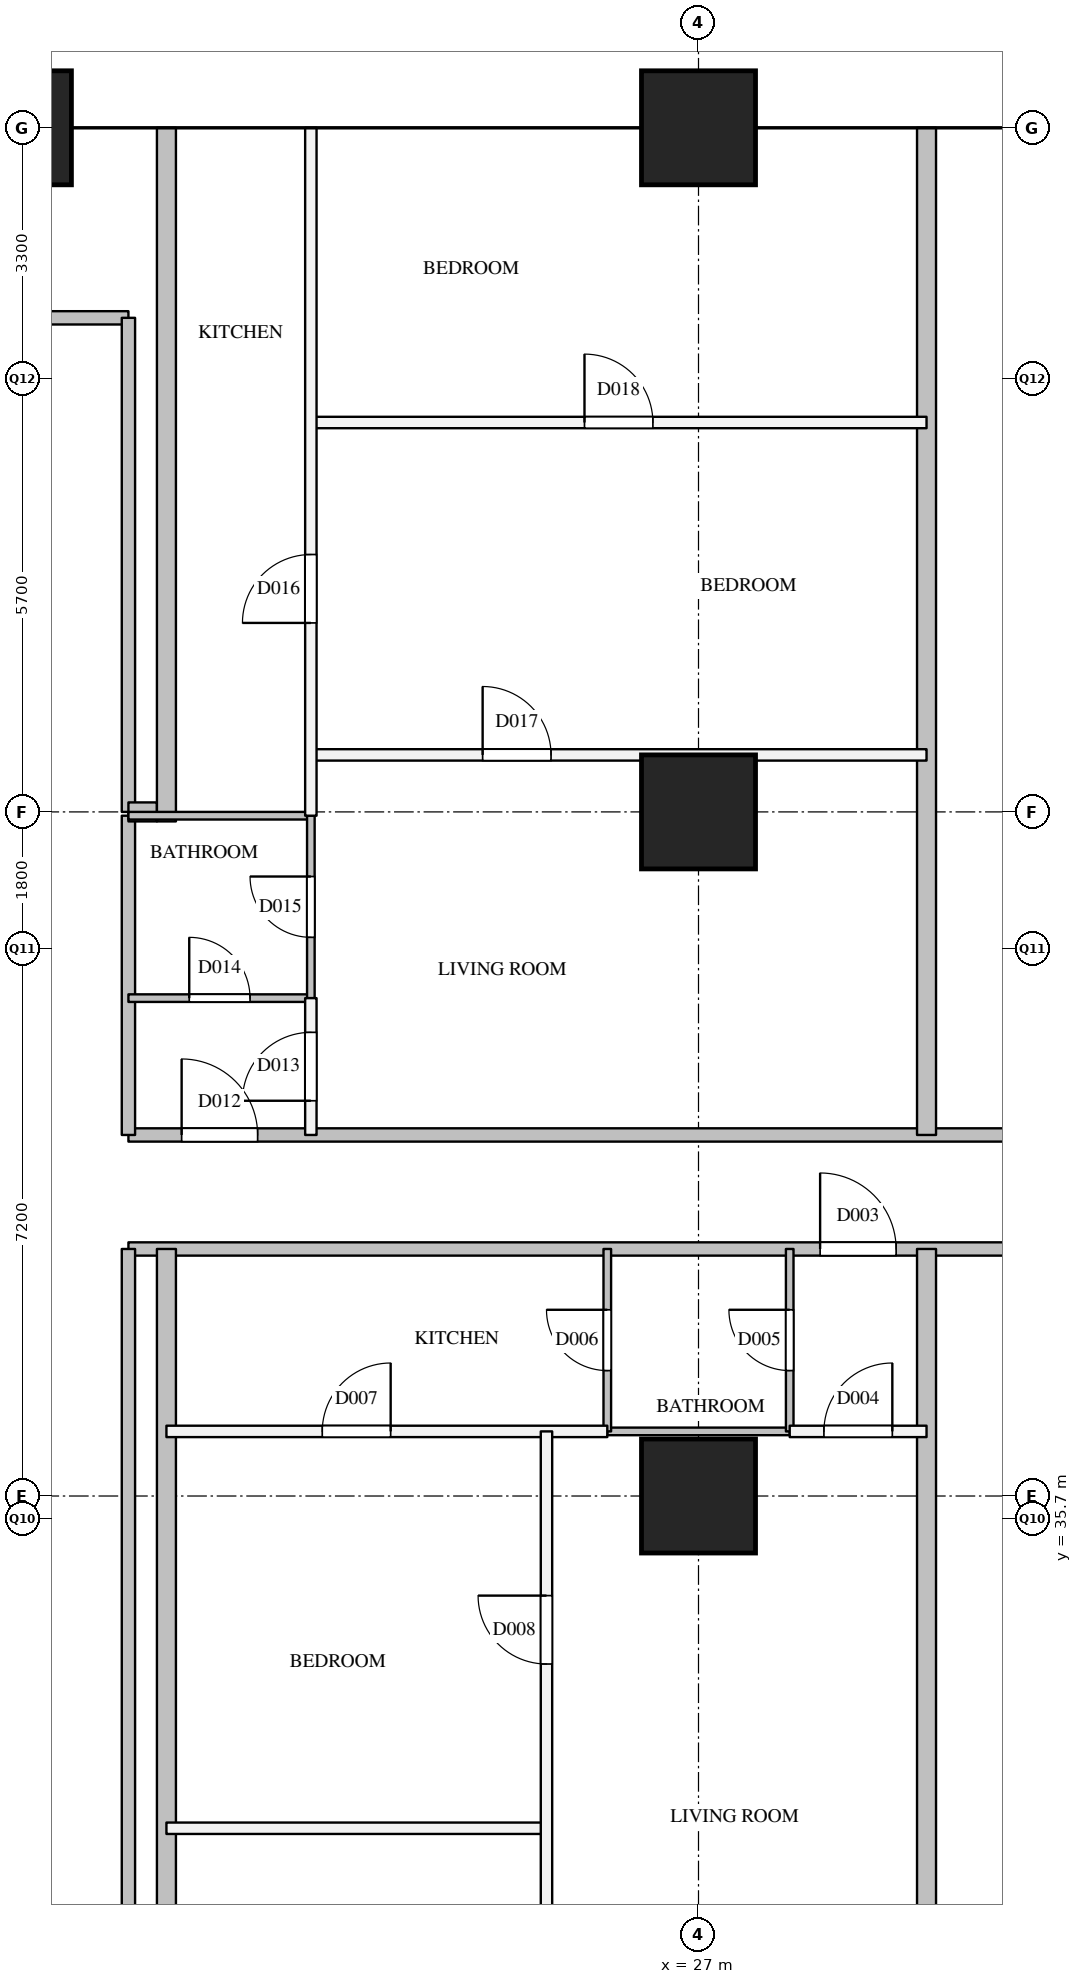
"""IFC4 building model, lengths in metres.
Left out: names, types, materials, properties, quantities, classifications, styles, units other than length and angle.
Written with IfcOpenShell. Run it as: python <this file> out.ifc"""

import sys

from ifc_helpers import new_model, si_unit, direction, frame, frame_2d, origin, origin_2d, place, context, subcontext, project, spatial, rectangle, extrude, element, fill, save


model = new_model("IFC4")
c1 = context("Model", 3, precision=1e-05, world=origin(), true_north=direction((0.0, 1.0)))
c2 = subcontext(c1, "Body", "Model", "MODEL_VIEW")
j1 = project(units=[si_unit("LENGTHUNIT", "METRE"), si_unit("PLANEANGLEUNIT", "RADIAN")], contexts=[c1])
p1 = place(None, origin())
s1 = spatial("IfcSite", under=j1, at=p1, CompositionType="ELEMENT")
p2 = place(p1, origin())
s2 = spatial("IfcBuilding", under=s1, at=p2, CompositionType="ELEMENT")
p3 = place(p2, frame((0.0, 0.0, 134.9)))
s3 = spatial("IfcBuildingStorey", under=s2, at=p3, CompositionType="ELEMENT", Elevation=134.9)
for number, where, z_axis, x_axis in (
    (1, (18.0, 54.0, 0.0), (0.0, 0.0, 1.0), (1.0, 0.0, 0.0)),
    (2, (27.0, 36.0, 0.0), (0.0, 0.0, 1.0), (1.0, 0.0, 0.0)),
    (3, (27.0, 45.0, 0.0), (0.0, 0.0, 1.0), (1.0, 0.0, 0.0)),
    (4, (27.0, 54.0, 0.0), (0.0, 0.0, 1.0), (1.0, 0.0, 0.0)),
):
    element("IfcColumn", number, at=place(p3, frame(where, z_axis=z_axis, x_axis=x_axis)), inside=s3, PredefinedType="COLUMN", context=c2, shape_type="SweptSolid", body=[
        extrude(rectangle(XDim=1.5, YDim=1.5, at=origin_2d()), origin(), (0.0, 0.0, 1.0), 3.9),
    ])
p4 = place(p3, frame((19.5, 39.25, 0.0), z_axis=(0.0, 0.0, 1.0), x_axis=(1.0, 0.0, 0.0)))
e5 = element("IfcWall", 5, at=p4, inside=s3, PredefinedType="PARTITIONING", context=c2, shape_type="SweptSolid", body=[
    extrude(rectangle(XDim=15.0, YDim=0.175, at=frame_2d((7.5, 0.0))), origin(), (0.0, 0.0, 1.0), 2.6),
])
p5 = place(p4, frame((9.1, 0.0, 0.0)))
e6 = element("IfcOpeningElement", 6, at=p5, cuts=e5, PredefinedType="OPENING", context=c2, shape_type="SweptSolid", body=[
    extrude(rectangle(XDim=1.0, YDim=2.1, at=frame_2d((0.5, 1.05))), frame((0.0, 0.097, 0.0), z_axis=(0.0, -1.0, 0.0), x_axis=(1.0, 0.0, 0.0)), (0.0, 0.0, 1.0), 0.195),
])
p6 = place(p3, frame((19.5, 40.75, 0.0), z_axis=(0.0, 0.0, 1.0), x_axis=(1.0, 0.0, 0.0)))
e7 = element("IfcWall", 7, at=p6, inside=s3, PredefinedType="PARTITIONING", context=c2, shape_type="SweptSolid", body=[
    extrude(rectangle(XDim=15.0, YDim=0.175, at=frame_2d((7.5, 0.0))), origin(), (0.0, 0.0, 1.0), 2.6),
])
p7 = place(p6, frame((0.7, 0.0, 0.0)))
e8 = element("IfcOpeningElement", 8, at=p7, cuts=e7, PredefinedType="OPENING", context=c2, shape_type="SweptSolid", body=[
    extrude(rectangle(XDim=1.0, YDim=2.1, at=frame_2d((0.5, 1.05))), frame((0.0, 0.097, 0.0), z_axis=(0.0, -1.0, 0.0), x_axis=(1.0, 0.0, 0.0)), (0.0, 0.0, 1.0), 0.195),
])
p8 = place(p3, frame((4.1, 51.5, 0.0), z_axis=(0.0, 0.0, 1.0), x_axis=(1.0, 0.0, 0.0)))
e9 = element("IfcWall", 9, at=p8, inside=s3, PredefinedType="PARTITIONING", context=c2, shape_type="SweptSolid", body=[
    extrude(rectangle(XDim=15.4, YDim=0.175, at=frame_2d((7.7, 0.0))), origin(), (0.0, 0.0, 1.0), 3.6),
])
p9 = place(p8, frame((9.284, 0.0, 0.0)))
e10 = element("IfcOpeningElement", 10, at=p9, cuts=e9, PredefinedType="OPENING", context=c2, shape_type="SweptSolid", body=[
    extrude(rectangle(XDim=0.9, YDim=2.1, at=frame_2d((0.45, 1.05))), frame((0.0, 0.097, 0.0), z_axis=(0.0, -1.0, 0.0), x_axis=(1.0, 0.0, 0.0)), (0.0, 0.0, 1.0), 0.195),
])
p10 = place(p3, frame((19.5, 28.5, 0.0), z_axis=(0.0, 0.0, 1.0), x_axis=(0.0, 1.0, 0.0)))
e11 = element("IfcWall", 11, at=p10, inside=s3, PredefinedType="PARTITIONING", context=c2, shape_type="SweptSolid", body=[
    extrude(rectangle(XDim=10.75, YDim=0.175, at=frame_2d((5.375, 0.0))), origin(), (0.0, 0.0, 1.0), 3.6),
])
p11 = place(p3, frame((19.5, 40.75, 0.0), z_axis=(0.0, 0.0, 1.0), x_axis=(0.0, 1.0, 0.0)))
e12 = element("IfcWall", 12, at=p11, inside=s3, PredefinedType="PARTITIONING", context=c2, shape_type="SweptSolid", body=[
    extrude(rectangle(XDim=4.2, YDim=0.175, at=frame_2d((2.1, 0.0))), origin(), (0.0, 0.0, 1.0), 3.6),
])
p12 = place(p3, frame((19.5, 45.0, 0.0), z_axis=(0.0, 0.0, 1.0), x_axis=(0.0, 1.0, 0.0)))
e13 = element("IfcWall", 13, at=p12, inside=s3, PredefinedType="PARTITIONING", context=c2, shape_type="SweptSolid", body=[
    extrude(rectangle(XDim=6.5, YDim=0.175, at=frame_2d((3.25, 0.0))), origin(), (0.0, 0.0, 1.0), 3.6),
])
p13 = place(p3, frame((20.0, 31.629, 0.0), z_axis=(0.0, 0.0, 1.0), x_axis=(1.0, 0.0, 0.0)))
e14 = element("IfcWall", 14, at=p13, inside=s3, PredefinedType="PARTITIONING", context=c2, shape_type="SweptSolid", body=[
    extrude(rectangle(XDim=5.0, YDim=0.15, at=frame_2d((2.5, 0.0))), origin(), (0.0, 0.0, 1.0), 3.6),
])
p14 = place(p3, frame((20.0, 36.85, 0.0), z_axis=(0.0, 0.0, 1.0), x_axis=(1.0, 0.0, 0.0)))
e15 = element("IfcWall", 15, at=p14, inside=s3, PredefinedType="PARTITIONING", context=c2, shape_type="SweptSolid", body=[
    extrude(rectangle(XDim=5.8, YDim=0.15, at=frame_2d((2.9, 0.0))), origin(), (0.0, 0.0, 1.0), 3.6),
])
p15 = place(p14, frame((2.05, 0.0, 0.0)))
e16 = element("IfcOpeningElement", 16, at=p15, cuts=e15, PredefinedType="OPENING", context=c2, shape_type="SweptSolid", body=[
    extrude(rectangle(XDim=0.9, YDim=2.1, at=frame_2d((0.45, 1.05))), frame((0.0, 0.085, 0.0), z_axis=(0.0, -1.0, 0.0), x_axis=(1.0, 0.0, 0.0)), (0.0, 0.0, 1.0), 0.17),
])
p16 = place(p3, frame((28.2, 36.85, 0.0), z_axis=(0.0, 0.0, 1.0), x_axis=(1.0, 0.0, 0.0)))
e17 = element("IfcWall", 17, at=p16, inside=s3, PredefinedType="PARTITIONING", context=c2, shape_type="SweptSolid", body=[
    extrude(rectangle(XDim=1.8, YDim=0.15, at=frame_2d((0.9, 0.0))), origin(), (0.0, 0.0, 1.0), 3.6),
])
p17 = place(p16, frame((0.45, 0.0, 0.0)))
e18 = element("IfcOpeningElement", 18, at=p17, cuts=e17, PredefinedType="OPENING", context=c2, shape_type="SweptSolid", body=[
    extrude(rectangle(XDim=0.9, YDim=2.1, at=frame_2d((0.45, 1.05))), frame((0.0, 0.085, 0.0), z_axis=(0.0, -1.0, 0.0), x_axis=(1.0, 0.0, 0.0)), (0.0, 0.0, 1.0), 0.17),
])
p18 = place(p3, frame((21.9, 45.75, 0.0), z_axis=(0.0, 0.0, 1.0), x_axis=(1.0, 0.0, 0.0)))
e19 = element("IfcWall", 19, at=p18, inside=s3, PredefinedType="PARTITIONING", context=c2, shape_type="SweptSolid", body=[
    extrude(rectangle(XDim=8.1, YDim=0.15, at=frame_2d((4.05, 0.0))), origin(), (0.0, 0.0, 1.0), 2.6),
])
p19 = place(p18, frame((2.26, 0.0, 0.0)))
e20 = element("IfcOpeningElement", 20, at=p19, cuts=e19, PredefinedType="OPENING", context=c2, shape_type="SweptSolid", body=[
    extrude(rectangle(XDim=0.9, YDim=2.1, at=frame_2d((0.45, 1.05))), frame((0.0, 0.085, 0.0), z_axis=(0.0, -1.0, 0.0), x_axis=(1.0, 0.0, 0.0)), (0.0, 0.0, 1.0), 0.17),
])
p20 = place(p3, frame((21.9, 50.123, 0.0), z_axis=(0.0, 0.0, 1.0), x_axis=(1.0, 0.0, 0.0)))
e21 = element("IfcWall", 21, at=p20, inside=s3, PredefinedType="PARTITIONING", context=c2, shape_type="SweptSolid", body=[
    extrude(rectangle(XDim=8.1, YDim=0.15, at=frame_2d((4.05, 0.0))), origin(), (0.0, 0.0, 1.0), 2.6),
])
p21 = place(p20, frame((3.6, 0.0, 0.0)))
e22 = element("IfcOpeningElement", 22, at=p21, cuts=e21, PredefinedType="OPENING", context=c2, shape_type="SweptSolid", body=[
    extrude(rectangle(XDim=0.9, YDim=2.1, at=frame_2d((0.45, 1.05))), frame((0.0, 0.085, 0.0), z_axis=(0.0, -1.0, 0.0), x_axis=(1.0, 0.0, 0.0)), (0.0, 0.0, 1.0), 0.17),
])
p22 = place(p3, frame((21.9, 40.75, 0.0), z_axis=(0.0, 0.0, 1.0), x_axis=(0.0, 1.0, 0.0)))
e23 = element("IfcWall", 23, at=p22, inside=s3, PredefinedType="PARTITIONING", context=c2, shape_type="SweptSolid", body=[
    extrude(rectangle(XDim=1.8, YDim=0.15, at=frame_2d((0.9, 0.0))), origin(), (0.0, 0.0, 1.0), 3.6),
])
p23 = place(p22, frame((0.45, 0.0, 0.0)))
e24 = element("IfcOpeningElement", 24, at=p23, cuts=e23, PredefinedType="OPENING", context=c2, shape_type="SweptSolid", body=[
    extrude(rectangle(XDim=0.9, YDim=2.1, at=frame_2d((0.45, 1.05))), frame((0.0, 0.085, 0.0), z_axis=(0.0, -1.0, 0.0), x_axis=(1.0, 0.0, 0.0)), (0.0, 0.0, 1.0), 0.17),
])
p24 = place(p3, frame((21.9, 44.95, 0.0), z_axis=(0.0, 0.0, 1.0), x_axis=(0.0, 1.0, 0.0)))
e25 = element("IfcWall", 25, at=p24, inside=s3, PredefinedType="PARTITIONING", context=c2, shape_type="SweptSolid", body=[
    extrude(rectangle(XDim=9.05, YDim=0.15, at=frame_2d((4.525, 0.0))), origin(), (0.0, 0.0, 1.0), 2.6),
])
p25 = place(p24, frame((2.536, 0.0, 0.0)))
e26 = element("IfcOpeningElement", 26, at=p25, cuts=e25, PredefinedType="OPENING", context=c2, shape_type="SweptSolid", body=[
    extrude(rectangle(XDim=0.9, YDim=2.1, at=frame_2d((0.45, 1.05))), frame((0.0, 0.085, 0.0), z_axis=(0.0, -1.0, 0.0), x_axis=(1.0, 0.0, 0.0)), (0.0, 0.0, 1.0), 0.17),
])
p26 = place(p3, frame((25.0, 27.0, 0.0), z_axis=(0.0, 0.0, 1.0), x_axis=(0.0, 1.0, 0.0)))
e27 = element("IfcWall", 27, at=p26, inside=s3, PredefinedType="PARTITIONING", context=c2, shape_type="SweptSolid", body=[
    extrude(rectangle(XDim=9.85, YDim=0.15, at=frame_2d((4.925, 0.0))), origin(), (0.0, 0.0, 1.0), 2.6),
])
p27 = place(p26, frame((6.79, 0.0, 0.0)))
e28 = element("IfcOpeningElement", 28, at=p27, cuts=e27, PredefinedType="OPENING", context=c2, shape_type="SweptSolid", body=[
    extrude(rectangle(XDim=0.9, YDim=2.1, at=frame_2d((0.45, 1.05))), frame((0.0, 0.085, 0.0), z_axis=(0.0, -1.0, 0.0), x_axis=(1.0, 0.0, 0.0)), (0.0, 0.0, 1.0), 0.17),
])
p28 = place(p26, frame((1.865, 0.0, 0.0)))
e29 = element("IfcOpeningElement", 29, at=p28, cuts=e27, PredefinedType="OPENING", context=c2, shape_type="SweptSolid", body=[
    extrude(rectangle(XDim=0.9, YDim=2.1, at=frame_2d((0.45, 1.05))), frame((0.0, 0.085, 0.0), z_axis=(0.0, -1.0, 0.0), x_axis=(1.0, 0.0, 0.0)), (0.0, 0.0, 1.0), 0.17),
])
p29 = place(p3, frame((19.5, 45.0, 0.0), z_axis=(0.0, 0.0, 1.0), x_axis=(1.0, 0.0, 0.0)))
e30 = element("IfcWall", 30, at=p29, inside=s3, PredefinedType="PARTITIONING", context=c2, shape_type="SweptSolid", body=[
    extrude(rectangle(XDim=0.375, YDim=0.25, at=frame_2d((0.188, 0.0))), origin(), (0.0, 0.0, 1.0), 3.6),
])
p30 = place(p3, frame((20.0, 27.0, 0.0), z_axis=(0.0, 0.0, 1.0), x_axis=(0.0, 1.0, 0.0)))
e31 = element("IfcWall", 31, at=p30, inside=s3, PredefinedType="PARTITIONING", context=c2, shape_type="SweptSolid", body=[
    extrude(rectangle(XDim=12.25, YDim=0.25, at=frame_2d((6.125, 0.0))), origin(), (0.0, 0.0, 1.0), 2.6),
])
p31 = place(p3, frame((20.0, 44.875, 0.0), z_axis=(0.0, 0.0, 1.0), x_axis=(0.0, 1.0, 0.0)))
e32 = element("IfcWall", 32, at=p31, inside=s3, PredefinedType="PARTITIONING", context=c2, shape_type="SweptSolid", body=[
    extrude(rectangle(XDim=9.125, YDim=0.25, at=frame_2d((4.562, 0.0))), origin(), (0.0, 0.0, 1.0), 2.6),
])
p32 = place(p3, frame((30.0, 27.0, 0.0), z_axis=(0.0, 0.0, 1.0), x_axis=(0.0, 1.0, 0.0)))
e33 = element("IfcWall", 33, at=p32, inside=s3, PredefinedType="PARTITIONING", context=c2, shape_type="SweptSolid", body=[
    extrude(rectangle(XDim=12.25, YDim=0.25, at=frame_2d((6.125, 0.0))), origin(), (0.0, 0.0, 1.0), 2.6),
])
p33 = place(p3, frame((30.0, 40.75, 0.0), z_axis=(0.0, 0.0, 1.0), x_axis=(0.0, 1.0, 0.0)))
e34 = element("IfcWall", 34, at=p33, inside=s3, PredefinedType="PARTITIONING", context=c2, shape_type="SweptSolid", body=[
    extrude(rectangle(XDim=13.25, YDim=0.25, at=frame_2d((6.625, 0.0))), origin(), (0.0, 0.0, 1.0), 2.6),
])
p34 = place(p3, frame((25.8, 36.85, 0.0), z_axis=(0.0, 0.0, 1.0), x_axis=(1.0, 0.0, 0.0)))
e35 = element("IfcWall", 35, at=p34, inside=s3, PredefinedType="PARTITIONING", context=c2, shape_type="SweptSolid", body=[
    extrude(rectangle(XDim=2.4, YDim=0.1, at=frame_2d((1.2, 0.0))), origin(), (0.0, 0.0, 1.0), 2.6),
])
p35 = place(p3, frame((19.5, 42.55, 0.0), z_axis=(0.0, 0.0, 1.0), x_axis=(1.0, 0.0, 0.0)))
e36 = element("IfcWall", 36, at=p35, inside=s3, PredefinedType="PARTITIONING", context=c2, shape_type="SweptSolid", body=[
    extrude(rectangle(XDim=2.4, YDim=0.1, at=frame_2d((1.2, 0.0))), origin(), (0.0, 0.0, 1.0), 3.6),
])
p36 = place(p35, frame((0.8, 0.0, 0.0)))
e37 = element("IfcOpeningElement", 37, at=p36, cuts=e36, PredefinedType="OPENING", context=c2, shape_type="SweptSolid", body=[
    extrude(rectangle(XDim=0.8, YDim=2.1, at=frame_2d((0.4, 1.05))), frame((0.0, 0.06, 0.0), z_axis=(0.0, -1.0, 0.0), x_axis=(1.0, 0.0, 0.0)), (0.0, 0.0, 1.0), 0.12),
])
p37 = place(p3, frame((19.5, 44.95, 0.0), z_axis=(0.0, 0.0, 1.0), x_axis=(1.0, 0.0, 0.0)))
e38 = element("IfcWall", 38, at=p37, inside=s3, PredefinedType="PARTITIONING", context=c2, shape_type="SweptSolid", body=[
    extrude(rectangle(XDim=2.4, YDim=0.1, at=frame_2d((1.2, 0.0))), origin(), (0.0, 0.0, 1.0), 3.6),
])
p38 = place(p3, frame((21.9, 42.55, 0.0), z_axis=(0.0, 0.0, 1.0), x_axis=(0.0, 1.0, 0.0)))
e39 = element("IfcWall", 39, at=p38, inside=s3, PredefinedType="PARTITIONING", context=c2, shape_type="SweptSolid", body=[
    extrude(rectangle(XDim=2.4, YDim=0.1, at=frame_2d((1.2, 0.0))), origin(), (0.0, 0.0, 1.0), 3.6),
])
p39 = place(p38, frame((0.8, 0.0, 0.0)))
e40 = element("IfcOpeningElement", 40, at=p39, cuts=e39, PredefinedType="OPENING", context=c2, shape_type="SweptSolid", body=[
    extrude(rectangle(XDim=0.8, YDim=2.1, at=frame_2d((0.4, 1.05))), frame((0.0, 0.06, 0.0), z_axis=(0.0, -1.0, 0.0), x_axis=(1.0, 0.0, 0.0)), (0.0, 0.0, 1.0), 0.12),
])
p40 = place(p3, frame((25.8, 36.85, 0.0), z_axis=(0.0, 0.0, 1.0), x_axis=(0.0, 1.0, 0.0)))
e41 = element("IfcWall", 41, at=p40, inside=s3, PredefinedType="PARTITIONING", context=c2, shape_type="SweptSolid", body=[
    extrude(rectangle(XDim=2.4, YDim=0.1, at=frame_2d((1.2, 0.0))), origin(), (0.0, 0.0, 1.0), 3.6),
])
p41 = place(p40, frame((0.8, 0.0, 0.0)))
e42 = element("IfcOpeningElement", 42, at=p41, cuts=e41, PredefinedType="OPENING", context=c2, shape_type="SweptSolid", body=[
    extrude(rectangle(XDim=0.8, YDim=2.1, at=frame_2d((0.4, 1.05))), frame((0.0, 0.06, 0.0), z_axis=(0.0, -1.0, 0.0), x_axis=(1.0, 0.0, 0.0)), (0.0, 0.0, 1.0), 0.12),
])
p42 = place(p3, frame((28.2, 36.85, 0.0), z_axis=(0.0, 0.0, 1.0), x_axis=(0.0, 1.0, 0.0)))
e43 = element("IfcWall", 43, at=p42, inside=s3, PredefinedType="PARTITIONING", context=c2, shape_type="SweptSolid", body=[
    extrude(rectangle(XDim=2.4, YDim=0.1, at=frame_2d((1.2, 0.0))), origin(), (0.0, 0.0, 1.0), 3.6),
])
p43 = place(p42, frame((0.8, 0.0, 0.0)))
e44 = element("IfcOpeningElement", 44, at=p43, cuts=e43, PredefinedType="OPENING", context=c2, shape_type="SweptSolid", body=[
    extrude(rectangle(XDim=0.8, YDim=2.1, at=frame_2d((0.4, 1.05))), frame((0.0, 0.06, 0.0), z_axis=(0.0, -1.0, 0.0), x_axis=(1.0, 0.0, 0.0)), (0.0, 0.0, 1.0), 0.12),
])
p44 = place(p5, origin())
e45 = element("IfcDoor", 45, at=p44, inside=s3, OperationType="SINGLE_SWING_LEFT", PredefinedType="DOOR", context=c2, shape_type="SweptSolid", body=[
    extrude(rectangle(XDim=1.0, YDim=2.1, at=frame_2d((0.5, 1.05))), frame((0.0, 0.025, 0.0), z_axis=(0.0, -1.0, 0.0), x_axis=(1.0, 0.0, 0.0)), (0.0, 0.0, 1.0), 0.05),
])
fill(e6, e45)
p45 = place(p17, origin())
e46 = element("IfcDoor", 46, at=p45, inside=s3, OperationType="SINGLE_SWING_RIGHT", PredefinedType="DOOR", context=c2, shape_type="SweptSolid", body=[
    extrude(rectangle(XDim=0.9, YDim=2.1, at=frame_2d((0.45, 1.05))), frame((0.0, 0.025, 0.0), z_axis=(0.0, -1.0, 0.0), x_axis=(1.0, 0.0, 0.0)), (0.0, 0.0, 1.0), 0.05),
])
fill(e18, e46)
p46 = place(p43, origin())
e47 = element("IfcDoor", 47, at=p46, inside=s3, OperationType="SINGLE_SWING_RIGHT", PredefinedType="DOOR", context=c2, shape_type="SweptSolid", body=[
    extrude(rectangle(XDim=0.8, YDim=2.1, at=frame_2d((0.4, 1.05))), frame((0.0, 0.025, 0.0), z_axis=(0.0, -1.0, 0.0), x_axis=(1.0, 0.0, 0.0)), (0.0, 0.0, 1.0), 0.05),
])
fill(e44, e47)
p47 = place(p41, origin())
e48 = element("IfcDoor", 48, at=p47, inside=s3, OperationType="SINGLE_SWING_RIGHT", PredefinedType="DOOR", context=c2, shape_type="SweptSolid", body=[
    extrude(rectangle(XDim=0.8, YDim=2.1, at=frame_2d((0.4, 1.05))), frame((0.0, 0.025, 0.0), z_axis=(0.0, -1.0, 0.0), x_axis=(1.0, 0.0, 0.0)), (0.0, 0.0, 1.0), 0.05),
])
fill(e42, e48)
p48 = place(p15, origin())
e49 = element("IfcDoor", 49, at=p48, inside=s3, OperationType="SINGLE_SWING_RIGHT", PredefinedType="DOOR", context=c2, shape_type="SweptSolid", body=[
    extrude(rectangle(XDim=0.9, YDim=2.1, at=frame_2d((0.45, 1.05))), frame((0.0, 0.025, 0.0), z_axis=(0.0, -1.0, 0.0), x_axis=(1.0, 0.0, 0.0)), (0.0, 0.0, 1.0), 0.05),
])
fill(e16, e49)
p49 = place(p27, origin())
e50 = element("IfcDoor", 50, at=p49, inside=s3, OperationType="SINGLE_SWING_RIGHT", PredefinedType="DOOR", context=c2, shape_type="SweptSolid", body=[
    extrude(rectangle(XDim=0.9, YDim=2.1, at=frame_2d((0.45, 1.05))), frame((0.0, 0.025, 0.0), z_axis=(0.0, -1.0, 0.0), x_axis=(1.0, 0.0, 0.0)), (0.0, 0.0, 1.0), 0.05),
])
fill(e28, e50)
p50 = place(p7, origin())
e51 = element("IfcDoor", 51, at=p50, inside=s3, OperationType="SINGLE_SWING_LEFT", PredefinedType="DOOR", context=c2, shape_type="SweptSolid", body=[
    extrude(rectangle(XDim=1.0, YDim=2.1, at=frame_2d((0.5, 1.05))), frame((0.0, 0.025, 0.0), z_axis=(0.0, -1.0, 0.0), x_axis=(1.0, 0.0, 0.0)), (0.0, 0.0, 1.0), 0.05),
])
fill(e8, e51)
p51 = place(p23, origin())
e52 = element("IfcDoor", 52, at=p51, inside=s3, OperationType="SINGLE_SWING_LEFT", PredefinedType="DOOR", context=c2, shape_type="SweptSolid", body=[
    extrude(rectangle(XDim=0.9, YDim=2.1, at=frame_2d((0.45, 1.05))), frame((0.0, 0.025, 0.0), z_axis=(0.0, -1.0, 0.0), x_axis=(1.0, 0.0, 0.0)), (0.0, 0.0, 1.0), 0.05),
])
fill(e24, e52)
p52 = place(p36, origin())
e53 = element("IfcDoor", 53, at=p52, inside=s3, OperationType="SINGLE_SWING_LEFT", PredefinedType="DOOR", context=c2, shape_type="SweptSolid", body=[
    extrude(rectangle(XDim=0.8, YDim=2.1, at=frame_2d((0.4, 1.05))), frame((0.0, 0.025, 0.0), z_axis=(0.0, -1.0, 0.0), x_axis=(1.0, 0.0, 0.0)), (0.0, 0.0, 1.0), 0.05),
])
fill(e37, e53)
p53 = place(p39, origin())
e54 = element("IfcDoor", 54, at=p53, inside=s3, OperationType="SINGLE_SWING_RIGHT", PredefinedType="DOOR", context=c2, shape_type="SweptSolid", body=[
    extrude(rectangle(XDim=0.8, YDim=2.1, at=frame_2d((0.4, 1.05))), frame((0.0, 0.025, 0.0), z_axis=(0.0, -1.0, 0.0), x_axis=(1.0, 0.0, 0.0)), (0.0, 0.0, 1.0), 0.05),
])
fill(e40, e54)
p54 = place(p25, origin())
e55 = element("IfcDoor", 55, at=p54, inside=s3, OperationType="SINGLE_SWING_LEFT", PredefinedType="DOOR", context=c2, shape_type="SweptSolid", body=[
    extrude(rectangle(XDim=0.9, YDim=2.1, at=frame_2d((0.45, 1.05))), frame((0.0, 0.025, 0.0), z_axis=(0.0, -1.0, 0.0), x_axis=(1.0, 0.0, 0.0)), (0.0, 0.0, 1.0), 0.05),
])
fill(e26, e55)
p55 = place(p19, origin())
e56 = element("IfcDoor", 56, at=p55, inside=s3, OperationType="SINGLE_SWING_LEFT", PredefinedType="DOOR", context=c2, shape_type="SweptSolid", body=[
    extrude(rectangle(XDim=0.9, YDim=2.1, at=frame_2d((0.45, 1.05))), frame((0.0, 0.025, 0.0), z_axis=(0.0, -1.0, 0.0), x_axis=(1.0, 0.0, 0.0)), (0.0, 0.0, 1.0), 0.05),
])
fill(e20, e56)
p56 = place(p21, origin())
e57 = element("IfcDoor", 57, at=p56, inside=s3, OperationType="SINGLE_SWING_LEFT", PredefinedType="DOOR", context=c2, shape_type="SweptSolid", body=[
    extrude(rectangle(XDim=0.9, YDim=2.1, at=frame_2d((0.45, 1.05))), frame((0.0, 0.025, 0.0), z_axis=(0.0, -1.0, 0.0), x_axis=(1.0, 0.0, 0.0)), (0.0, 0.0, 1.0), 0.05),
])
fill(e22, e57)
save(model, sys.argv[1])
